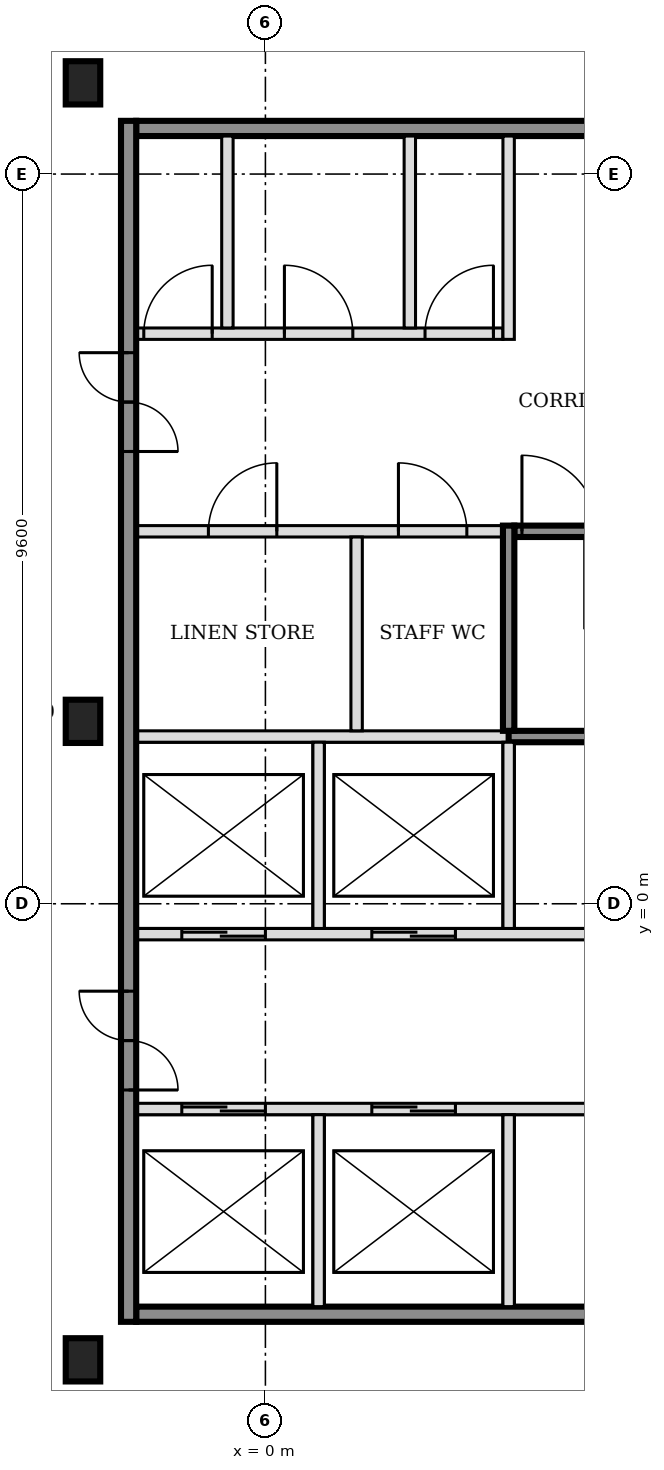
"""IFC4 building model, lengths in metres.
Left out: names, types, materials, properties, quantities, classifications, styles, units other than length and angle.
Written with IfcOpenShell. Run it as: python <this file> out.ifc"""

import sys

from ifc_helpers import new_model, si_unit, direction, frame, frame_2d, origin, origin_2d, place, context, subcontext, project, spatial, rectangle, i_section, extrude, element, fill, save


model = new_model("IFC4")
c1 = context("Model", 3, precision=1e-05, world=origin(), true_north=direction((0.0, 1.0)))
c2 = subcontext(c1, "Body", "Model", "MODEL_VIEW")
j1 = project(units=[si_unit("LENGTHUNIT", "METRE"), si_unit("PLANEANGLEUNIT", "RADIAN")], contexts=[c1])
p1 = place(None, origin())
s1 = spatial("IfcSite", under=j1, at=p1, CompositionType="ELEMENT")
p2 = place(p1, origin())
s2 = spatial("IfcBuilding", under=s1, at=p2, CompositionType="ELEMENT")
p3 = place(p2, frame((0.0, 0.0, 51.0)))
s3 = spatial("IfcBuildingStorey", under=s2, at=p3, CompositionType="ELEMENT", Elevation=51.0)
for number, where, z_axis, x_axis in (
    (1, (-2.4, -6.0, -0.15), (0.0, 0.0, 1.0), (1.0, 0.0, 0.0)),
    (2, (-2.4, 2.4, -0.15), (0.0, 0.0, 1.0), (1.0, 0.0, 0.0)),
    (3, (-2.4, 10.8, -0.15), (0.0, 0.0, 1.0), (1.0, 0.0, 0.0)),
):
    element("IfcColumn", number, at=place(p3, frame(where, z_axis=z_axis, x_axis=x_axis)), inside=s3, PredefinedType="COLUMN", context=c2, shape_type="SweptSolid", body=[
        extrude(i_section(OverallWidth=0.454, OverallDepth=0.569, WebThickness=0.078, FlangeThickness=0.125, FilletRadius=0.015, at=origin_2d()), origin(), (0.0, 0.0, 1.0), 3.6),
    ])
p4 = place(p3, frame((-1.7, -5.4, 0.0), z_axis=(0.0, 0.0, 1.0), x_axis=(1.0, 0.0, 0.0)))
e4 = element("IfcWall", 4, at=p4, inside=s3, PredefinedType="SOLIDWALL", context=c2, shape_type="SweptSolid", body=[
    extrude(rectangle(XDim=7.9, YDim=0.2, at=frame_2d((3.95, 0.0))), origin(), (0.0, 0.0, 1.0), 3.45),
])
p5 = place(p3, frame((-1.7, -2.7, 0.0), z_axis=(0.0, 0.0, 1.0), x_axis=(1.0, 0.0, 0.0)))
e5 = element("IfcWall", 5, at=p5, inside=s3, PredefinedType="SOLIDWALL", context=c2, shape_type="SweptSolid", body=[
    extrude(rectangle(XDim=7.9, YDim=0.15, at=frame_2d((3.95, 0.0))), origin(), (0.0, 0.0, 1.0), 3.45),
])
p6 = place(p5, frame((0.6, 0.0, 0.0)))
e6 = element("IfcOpeningElement", 6, at=p6, cuts=e5, PredefinedType="OPENING", context=c2, shape_type="SweptSolid", body=[
    extrude(rectangle(XDim=1.1, YDim=2.1, at=frame_2d((0.55, 1.05))), frame((0.0, 0.085, 0.0), z_axis=(0.0, -1.0, 0.0), x_axis=(1.0, 0.0, 0.0)), (0.0, 0.0, 1.0), 0.17),
])
p7 = place(p5, frame((3.1, 0.0, 0.0)))
e7 = element("IfcOpeningElement", 7, at=p7, cuts=e5, PredefinedType="OPENING", context=c2, shape_type="SweptSolid", body=[
    extrude(rectangle(XDim=1.1, YDim=2.1, at=frame_2d((0.55, 1.05))), frame((0.0, 0.085, 0.0), z_axis=(0.0, -1.0, 0.0), x_axis=(1.0, 0.0, 0.0)), (0.0, 0.0, 1.0), 0.17),
])
p8 = place(p3, frame((-1.7, -0.4, 0.0), z_axis=(0.0, 0.0, 1.0), x_axis=(1.0, 0.0, 0.0)))
e8 = element("IfcWall", 8, at=p8, inside=s3, PredefinedType="SOLIDWALL", context=c2, shape_type="SweptSolid", body=[
    extrude(rectangle(XDim=15.925, YDim=0.15, at=frame_2d((7.962, 0.0))), origin(), (0.0, 0.0, 1.0), 3.45),
])
p9 = place(p8, frame((0.6, 0.0, 0.0)))
e9 = element("IfcOpeningElement", 9, at=p9, cuts=e8, PredefinedType="OPENING", context=c2, shape_type="SweptSolid", body=[
    extrude(rectangle(XDim=1.1, YDim=2.1, at=frame_2d((0.55, 1.05))), frame((0.0, 0.085, 0.0), z_axis=(0.0, -1.0, 0.0), x_axis=(1.0, 0.0, 0.0)), (0.0, 0.0, 1.0), 0.17),
])
p10 = place(p8, frame((3.1, 0.0, 0.0)))
e10 = element("IfcOpeningElement", 10, at=p10, cuts=e8, PredefinedType="OPENING", context=c2, shape_type="SweptSolid", body=[
    extrude(rectangle(XDim=1.1, YDim=2.1, at=frame_2d((0.55, 1.05))), frame((0.0, 0.085, 0.0), z_axis=(0.0, -1.0, 0.0), x_axis=(1.0, 0.0, 0.0)), (0.0, 0.0, 1.0), 0.17),
])
p11 = place(p8, frame((11.575, 0.0, 0.0)))
e11 = element("IfcOpeningElement", 11, at=p11, cuts=e8, PredefinedType="OPENING", context=c2, shape_type="SweptSolid", body=[
    extrude(rectangle(XDim=1.2, YDim=2.1, at=frame_2d((0.6, 1.05))), frame((0.0, 0.085, 0.0), z_axis=(0.0, -1.0, 0.0), x_axis=(1.0, 0.0, 0.0)), (0.0, 0.0, 1.0), 0.17),
])
p12 = place(p8, frame((14.125, 0.0, 0.0)))
e12 = element("IfcOpeningElement", 12, at=p12, cuts=e8, PredefinedType="OPENING", context=c2, shape_type="SweptSolid", body=[
    extrude(rectangle(XDim=1.2, YDim=2.1, at=frame_2d((0.6, 1.05))), frame((0.0, 0.085, 0.0), z_axis=(0.0, -1.0, 0.0), x_axis=(1.0, 0.0, 0.0)), (0.0, 0.0, 1.0), 0.17),
])
p13 = place(p3, frame((-1.7, 2.2, 0.0), z_axis=(0.0, 0.0, 1.0), x_axis=(1.0, 0.0, 0.0)))
e13 = element("IfcWall", 13, at=p13, inside=s3, PredefinedType="SOLIDWALL", context=c2, shape_type="SweptSolid", body=[
    extrude(rectangle(XDim=4.9, YDim=0.15, at=frame_2d((2.45, 0.0))), origin(), (0.0, 0.0, 1.0), 3.45),
])
p14 = place(p3, frame((3.2, 2.2, 0.0), z_axis=(0.0, 0.0, 1.0), x_axis=(1.0, 0.0, 0.0)))
e14 = element("IfcWall", 14, at=p14, inside=s3, PredefinedType="SOLIDWALL", context=c2, shape_type="SweptSolid", body=[
    extrude(rectangle(XDim=6.5, YDim=0.15, at=frame_2d((3.25, 0.0))), origin(), (0.0, 0.0, 1.0), 3.45),
])
p15 = place(p3, frame((-1.7, 4.9, 0.0), z_axis=(0.0, 0.0, 1.0), x_axis=(1.0, 0.0, 0.0)))
e15 = element("IfcWall", 15, at=p15, inside=s3, PredefinedType="PARTITIONING", context=c2, shape_type="SweptSolid", body=[
    extrude(rectangle(XDim=4.825, YDim=0.15, at=frame_2d((2.413, 0.0))), origin(), (0.0, 0.0, 1.0), 3.45),
])
p16 = place(p15, frame((0.95, 0.0, 0.0)))
e16 = element("IfcOpeningElement", 16, at=p16, cuts=e15, PredefinedType="OPENING", context=c2, shape_type="SweptSolid", body=[
    extrude(rectangle(XDim=0.9, YDim=2.1, at=frame_2d((0.45, 1.05))), frame((0.0, 0.085, 0.0), z_axis=(0.0, -1.0, 0.0), x_axis=(1.0, 0.0, 0.0)), (0.0, 0.0, 1.0), 0.17),
])
p17 = place(p15, frame((3.45, 0.0, 0.0)))
e17 = element("IfcOpeningElement", 17, at=p17, cuts=e15, PredefinedType="OPENING", context=c2, shape_type="SweptSolid", body=[
    extrude(rectangle(XDim=0.9, YDim=2.1, at=frame_2d((0.45, 1.05))), frame((0.0, 0.085, 0.0), z_axis=(0.0, -1.0, 0.0), x_axis=(1.0, 0.0, 0.0)), (0.0, 0.0, 1.0), 0.17),
])
p18 = place(p3, frame((3.275, 4.9, 0.0), z_axis=(0.0, 0.0, 1.0), x_axis=(1.0, 0.0, 0.0)))
e18 = element("IfcWall", 18, at=p18, inside=s3, PredefinedType="SOLIDWALL", context=c2, shape_type="SweptSolid", body=[
    extrude(rectangle(XDim=6.425, YDim=0.15, at=frame_2d((3.212, 0.0))), origin(), (0.0, 0.0, 1.0), 3.45),
])
p19 = place(p18, frame((0.1, 0.0, 0.0)))
e19 = element("IfcOpeningElement", 19, at=p19, cuts=e18, PredefinedType="OPENING", context=c2, shape_type="SweptSolid", body=[
    extrude(rectangle(XDim=1.0, YDim=2.1, at=frame_2d((0.5, 1.05))), frame((0.0, 0.085, 0.0), z_axis=(0.0, -1.0, 0.0), x_axis=(1.0, 0.0, 0.0)), (0.0, 0.0, 1.0), 0.17),
])
p20 = place(p3, frame((-1.7, 7.5, 0.0), z_axis=(0.0, 0.0, 1.0), x_axis=(1.0, 0.0, 0.0)))
e20 = element("IfcWall", 20, at=p20, inside=s3, PredefinedType="PARTITIONING", context=c2, shape_type="SweptSolid", body=[
    extrude(rectangle(XDim=4.825, YDim=0.15, at=frame_2d((2.413, 0.0))), origin(), (0.0, 0.0, 1.0), 3.45),
])
p21 = place(p20, frame((0.1, 0.0, 0.0)))
e21 = element("IfcOpeningElement", 21, at=p21, cuts=e20, PredefinedType="OPENING", context=c2, shape_type="SweptSolid", body=[
    extrude(rectangle(XDim=0.9, YDim=2.1, at=frame_2d((0.45, 1.05))), frame((0.0, 0.085, 0.0), z_axis=(0.0, -1.0, 0.0), x_axis=(1.0, 0.0, 0.0)), (0.0, 0.0, 1.0), 0.17),
])
p22 = place(p20, frame((1.95, 0.0, 0.0)))
e22 = element("IfcOpeningElement", 22, at=p22, cuts=e20, PredefinedType="OPENING", context=c2, shape_type="SweptSolid", body=[
    extrude(rectangle(XDim=0.9, YDim=2.1, at=frame_2d((0.45, 1.05))), frame((0.0, 0.085, 0.0), z_axis=(0.0, -1.0, 0.0), x_axis=(1.0, 0.0, 0.0)), (0.0, 0.0, 1.0), 0.17),
])
p23 = place(p20, frame((3.8, 0.0, 0.0)))
e23 = element("IfcOpeningElement", 23, at=p23, cuts=e20, PredefinedType="OPENING", context=c2, shape_type="SweptSolid", body=[
    extrude(rectangle(XDim=0.9, YDim=2.1, at=frame_2d((0.45, 1.05))), frame((0.0, 0.085, 0.0), z_axis=(0.0, -1.0, 0.0), x_axis=(1.0, 0.0, 0.0)), (0.0, 0.0, 1.0), 0.17),
])
p24 = place(p3, frame((-1.7, 10.2, 0.0), z_axis=(0.0, 0.0, 1.0), x_axis=(1.0, 0.0, 0.0)))
e24 = element("IfcWall", 24, at=p24, inside=s3, PredefinedType="SOLIDWALL", context=c2, shape_type="SweptSolid", body=[
    extrude(rectangle(XDim=7.9, YDim=0.2, at=frame_2d((3.95, 0.0))), origin(), (0.0, 0.0, 1.0), 3.45),
])
p25 = place(p3, frame((-1.8, -5.5, 0.0), z_axis=(0.0, 0.0, 1.0), x_axis=(0.0, 1.0, 0.0)))
e25 = element("IfcWall", 25, at=p25, inside=s3, PredefinedType="SOLIDWALL", context=c2, shape_type="SweptSolid", body=[
    extrude(rectangle(XDim=15.8, YDim=0.2, at=frame_2d((7.9, 0.0))), origin(), (0.0, 0.0, 1.0), 3.45),
])
p26 = place(p25, frame((3.05, 0.0, 0.0)))
e26 = element("IfcOpeningElement", 26, at=p26, cuts=e25, PredefinedType="OPENING", context=c2, shape_type="SweptSolid", body=[
    extrude(rectangle(XDim=1.3, YDim=2.1, at=frame_2d((0.65, 1.05))), frame((0.0, 0.11, 0.0), z_axis=(0.0, -1.0, 0.0), x_axis=(1.0, 0.0, 0.0)), (0.0, 0.0, 1.0), 0.22),
])
p27 = place(p25, frame((11.45, 0.0, 0.0)))
e27 = element("IfcOpeningElement", 27, at=p27, cuts=e25, PredefinedType="OPENING", context=c2, shape_type="SweptSolid", body=[
    extrude(rectangle(XDim=1.3, YDim=2.1, at=frame_2d((0.65, 1.05))), frame((0.0, 0.11, 0.0), z_axis=(0.0, -1.0, 0.0), x_axis=(1.0, 0.0, 0.0)), (0.0, 0.0, 1.0), 0.22),
])
p28 = place(p3, frame((-0.5, 7.575, 0.0), z_axis=(0.0, 0.0, 1.0), x_axis=(0.0, 1.0, 0.0)))
e28 = element("IfcWall", 28, at=p28, inside=s3, PredefinedType="PARTITIONING", context=c2, shape_type="SweptSolid", body=[
    extrude(rectangle(XDim=2.525, YDim=0.15, at=frame_2d((1.263, 0.0))), origin(), (0.0, 0.0, 1.0), 3.45),
])
p29 = place(p3, frame((0.7, -5.3, 0.0), z_axis=(0.0, 0.0, 1.0), x_axis=(0.0, 1.0, 0.0)))
e29 = element("IfcWall", 29, at=p29, inside=s3, PredefinedType="SOLIDWALL", context=c2, shape_type="SweptSolid", body=[
    extrude(rectangle(XDim=2.525, YDim=0.15, at=frame_2d((1.263, 0.0))), origin(), (0.0, 0.0, 1.0), 3.45),
])
p30 = place(p3, frame((0.7, -0.325, 0.0), z_axis=(0.0, 0.0, 1.0), x_axis=(0.0, 1.0, 0.0)))
e30 = element("IfcWall", 30, at=p30, inside=s3, PredefinedType="SOLIDWALL", context=c2, shape_type="SweptSolid", body=[
    extrude(rectangle(XDim=2.45, YDim=0.15, at=frame_2d((1.225, 0.0))), origin(), (0.0, 0.0, 1.0), 3.45),
])
p31 = place(p3, frame((1.2, 2.275, 0.0), z_axis=(0.0, 0.0, 1.0), x_axis=(0.0, 1.0, 0.0)))
e31 = element("IfcWall", 31, at=p31, inside=s3, PredefinedType="PARTITIONING", context=c2, shape_type="SweptSolid", body=[
    extrude(rectangle(XDim=2.55, YDim=0.15, at=frame_2d((1.275, 0.0))), origin(), (0.0, 0.0, 1.0), 3.45),
])
p32 = place(p3, frame((1.9, 7.575, 0.0), z_axis=(0.0, 0.0, 1.0), x_axis=(0.0, 1.0, 0.0)))
e32 = element("IfcWall", 32, at=p32, inside=s3, PredefinedType="PARTITIONING", context=c2, shape_type="SweptSolid", body=[
    extrude(rectangle(XDim=2.525, YDim=0.15, at=frame_2d((1.263, 0.0))), origin(), (0.0, 0.0, 1.0), 3.45),
])
p33 = place(p3, frame((3.2, -5.3, 0.0), z_axis=(0.0, 0.0, 1.0), x_axis=(0.0, 1.0, 0.0)))
e33 = element("IfcWall", 33, at=p33, inside=s3, PredefinedType="SOLIDWALL", context=c2, shape_type="SweptSolid", body=[
    extrude(rectangle(XDim=2.525, YDim=0.15, at=frame_2d((1.263, 0.0))), origin(), (0.0, 0.0, 1.0), 3.45),
])
p34 = place(p3, frame((3.2, -0.325, 0.0), z_axis=(0.0, 0.0, 1.0), x_axis=(0.0, 1.0, 0.0)))
e34 = element("IfcWall", 34, at=p34, inside=s3, PredefinedType="SOLIDWALL", context=c2, shape_type="SweptSolid", body=[
    extrude(rectangle(XDim=2.45, YDim=0.15, at=frame_2d((1.225, 0.0))), origin(), (0.0, 0.0, 1.0), 3.45),
])
p35 = place(p3, frame((3.2, 2.275, 0.0), z_axis=(0.0, 0.0, 1.0), x_axis=(0.0, 1.0, 0.0)))
e35 = element("IfcWall", 35, at=p35, inside=s3, PredefinedType="SOLIDWALL", context=c2, shape_type="SweptSolid", body=[
    extrude(rectangle(XDim=2.7, YDim=0.15, at=frame_2d((1.35, 0.0))), origin(), (0.0, 0.0, 1.0), 3.45),
])
p36 = place(p3, frame((3.2, 7.425, 0.0), z_axis=(0.0, 0.0, 1.0), x_axis=(0.0, 1.0, 0.0)))
e36 = element("IfcWall", 36, at=p36, inside=s3, PredefinedType="PARTITIONING", context=c2, shape_type="SweptSolid", body=[
    extrude(rectangle(XDim=2.675, YDim=0.15, at=frame_2d((1.337, 0.0))), origin(), (0.0, 0.0, 1.0), 3.45),
])
p37 = place(p6, origin())
e37 = element("IfcDoor", 37, at=p37, inside=s3, OperationType="DOUBLE_DOOR_SLIDING", PredefinedType="DOOR", context=c2, shape_type="SweptSolid", body=[
    extrude(rectangle(XDim=1.1, YDim=2.1, at=frame_2d((0.55, 1.05))), frame((0.0, 0.025, 0.0), z_axis=(0.0, -1.0, 0.0), x_axis=(1.0, 0.0, 0.0)), (0.0, 0.0, 1.0), 0.05),
])
fill(e6, e37)
p38 = place(p7, origin())
e38 = element("IfcDoor", 38, at=p38, inside=s3, OperationType="DOUBLE_DOOR_SLIDING", PredefinedType="DOOR", context=c2, shape_type="SweptSolid", body=[
    extrude(rectangle(XDim=1.1, YDim=2.1, at=frame_2d((0.55, 1.05))), frame((0.0, 0.025, 0.0), z_axis=(0.0, -1.0, 0.0), x_axis=(1.0, 0.0, 0.0)), (0.0, 0.0, 1.0), 0.05),
])
fill(e7, e38)
p39 = place(p9, origin())
e39 = element("IfcDoor", 39, at=p39, inside=s3, OperationType="DOUBLE_DOOR_SLIDING", PredefinedType="DOOR", context=c2, shape_type="SweptSolid", body=[
    extrude(rectangle(XDim=1.1, YDim=2.1, at=frame_2d((0.55, 1.05))), frame((0.0, 0.025, 0.0), z_axis=(0.0, -1.0, 0.0), x_axis=(1.0, 0.0, 0.0)), (0.0, 0.0, 1.0), 0.05),
])
fill(e9, e39)
p40 = place(p10, origin())
e40 = element("IfcDoor", 40, at=p40, inside=s3, OperationType="DOUBLE_DOOR_SLIDING", PredefinedType="DOOR", context=c2, shape_type="SweptSolid", body=[
    extrude(rectangle(XDim=1.1, YDim=2.1, at=frame_2d((0.55, 1.05))), frame((0.0, 0.025, 0.0), z_axis=(0.0, -1.0, 0.0), x_axis=(1.0, 0.0, 0.0)), (0.0, 0.0, 1.0), 0.05),
])
fill(e10, e40)
p41 = place(p19, origin())
e41 = element("IfcDoor", 41, at=p41, inside=s3, OperationType="SINGLE_SWING_LEFT", PredefinedType="DOOR", context=c2, shape_type="SweptSolid", body=[
    extrude(rectangle(XDim=1.0, YDim=2.1, at=frame_2d((0.5, 1.05))), frame((0.0, 0.025, 0.0), z_axis=(0.0, -1.0, 0.0), x_axis=(1.0, 0.0, 0.0)), (0.0, 0.0, 1.0), 0.05),
])
fill(e19, e41)
p42 = place(p26, origin())
e42 = element("IfcDoor", 42, at=p42, inside=s3, OperationType="DOUBLE_DOOR_SINGLE_SWING", PredefinedType="DOOR", context=c2, shape_type="SweptSolid", body=[
    extrude(rectangle(XDim=1.3, YDim=2.1, at=frame_2d((0.65, 1.05))), frame((0.0, 0.025, 0.0), z_axis=(0.0, -1.0, 0.0), x_axis=(1.0, 0.0, 0.0)), (0.0, 0.0, 1.0), 0.05),
])
fill(e26, e42)
p43 = place(p27, origin())
e43 = element("IfcDoor", 43, at=p43, inside=s3, OperationType="DOUBLE_DOOR_SINGLE_SWING", PredefinedType="DOOR", context=c2, shape_type="SweptSolid", body=[
    extrude(rectangle(XDim=1.3, YDim=2.1, at=frame_2d((0.65, 1.05))), frame((0.0, 0.025, 0.0), z_axis=(0.0, -1.0, 0.0), x_axis=(1.0, 0.0, 0.0)), (0.0, 0.0, 1.0), 0.05),
])
fill(e27, e43)
p44 = place(p16, origin())
e44 = element("IfcDoor", 44, at=p44, inside=s3, OperationType="SINGLE_SWING_RIGHT", PredefinedType="DOOR", context=c2, shape_type="SweptSolid", body=[
    extrude(rectangle(XDim=0.9, YDim=2.1, at=frame_2d((0.45, 1.05))), frame((0.0, 0.025, 0.0), z_axis=(0.0, -1.0, 0.0), x_axis=(1.0, 0.0, 0.0)), (0.0, 0.0, 1.0), 0.05),
])
fill(e16, e44)
p45 = place(p17, origin())
e45 = element("IfcDoor", 45, at=p45, inside=s3, OperationType="SINGLE_SWING_LEFT", PredefinedType="DOOR", context=c2, shape_type="SweptSolid", body=[
    extrude(rectangle(XDim=0.9, YDim=2.1, at=frame_2d((0.45, 1.05))), frame((0.0, 0.025, 0.0), z_axis=(0.0, -1.0, 0.0), x_axis=(1.0, 0.0, 0.0)), (0.0, 0.0, 1.0), 0.05),
])
fill(e17, e45)
p46 = place(p21, origin())
e46 = element("IfcDoor", 46, at=p46, inside=s3, OperationType="SINGLE_SWING_RIGHT", PredefinedType="DOOR", context=c2, shape_type="SweptSolid", body=[
    extrude(rectangle(XDim=0.9, YDim=2.1, at=frame_2d((0.45, 1.05))), frame((0.0, 0.025, 0.0), z_axis=(0.0, -1.0, 0.0), x_axis=(1.0, 0.0, 0.0)), (0.0, 0.0, 1.0), 0.05),
])
fill(e21, e46)
p47 = place(p22, origin())
e47 = element("IfcDoor", 47, at=p47, inside=s3, OperationType="SINGLE_SWING_LEFT", PredefinedType="DOOR", context=c2, shape_type="SweptSolid", body=[
    extrude(rectangle(XDim=0.9, YDim=2.1, at=frame_2d((0.45, 1.05))), frame((0.0, 0.025, 0.0), z_axis=(0.0, -1.0, 0.0), x_axis=(1.0, 0.0, 0.0)), (0.0, 0.0, 1.0), 0.05),
])
fill(e22, e47)
p48 = place(p23, origin())
e48 = element("IfcDoor", 48, at=p48, inside=s3, OperationType="SINGLE_SWING_RIGHT", PredefinedType="DOOR", context=c2, shape_type="SweptSolid", body=[
    extrude(rectangle(XDim=0.9, YDim=2.1, at=frame_2d((0.45, 1.05))), frame((0.0, 0.025, 0.0), z_axis=(0.0, -1.0, 0.0), x_axis=(1.0, 0.0, 0.0)), (0.0, 0.0, 1.0), 0.05),
])
fill(e23, e48)
save(model, sys.argv[1])
